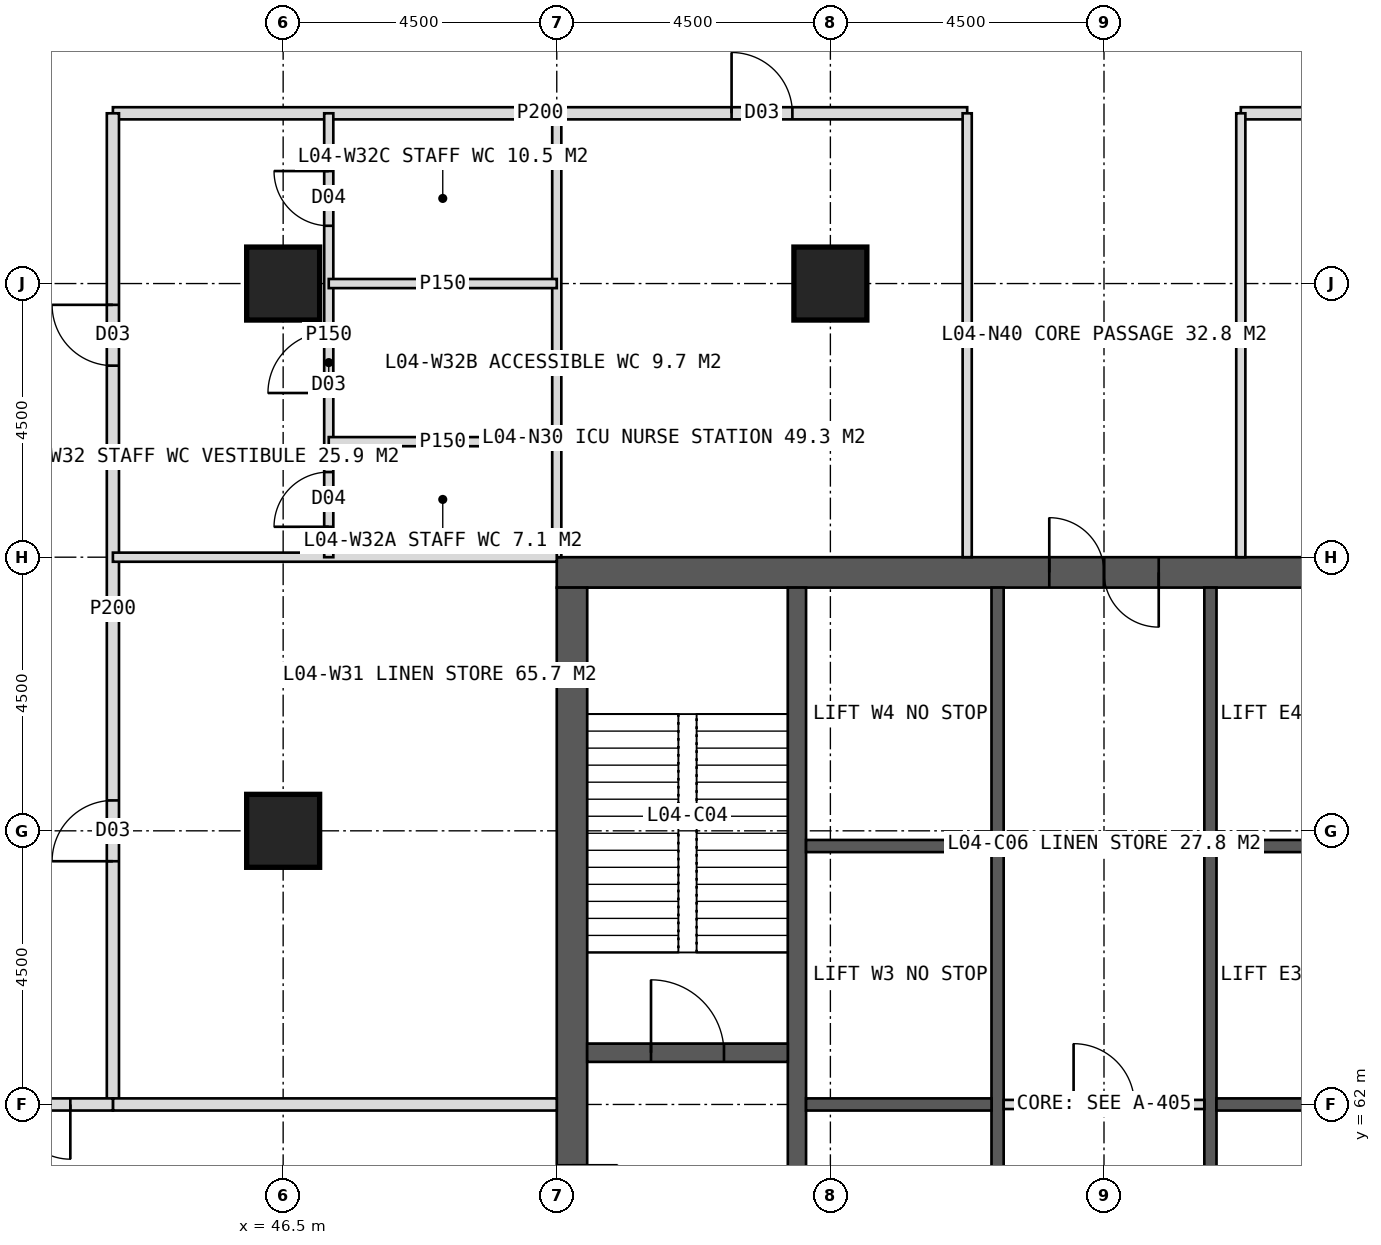
"""IFC4 building model, lengths in metres.
Left out: names, types, materials, properties, quantities, classifications, styles, units other than length and angle.
Written with IfcOpenShell. Run it as: python <this file> out.ifc"""

import sys

from ifc_helpers import new_model, si_unit, direction, frame, frame_2d, origin, origin_2d, place, context, subcontext, project, spatial, rectangle, hollow_rectangle, extrude, element, fill, save


model = new_model("IFC4")
c1 = context("Model", 3, precision=1e-05, world=origin(), true_north=direction((0.0, 1.0)))
c2 = subcontext(c1, "Body", "Model", "MODEL_VIEW")
j1 = project(units=[si_unit("LENGTHUNIT", "METRE"), si_unit("PLANEANGLEUNIT", "RADIAN")], contexts=[c1])
p1 = place(None, origin())
s1 = spatial("IfcSite", under=j1, at=p1, CompositionType="ELEMENT")
p2 = place(p1, origin())
s2 = spatial("IfcBuilding", under=s1, at=p2, CompositionType="ELEMENT")
p3 = place(p2, frame((0.0, 0.0, 21.0)))
s3 = spatial("IfcBuildingStorey", under=s2, at=p3, CompositionType="ELEMENT", Elevation=21.0)
p4 = place(p3, frame((51.0, 70.75, 0.0), z_axis=(0.0, 0.0, 1.0), x_axis=(1.0, 0.0, 0.0)))
e1 = element("IfcWall", 1, at=p4, inside=s3, PredefinedType="SHEAR", context=c2, shape_type="SweptSolid", body=[
    extrude(rectangle(XDim=18.0, YDim=0.5, at=frame_2d((9.0, 0.0))), origin(), (0.0, 0.0, 1.0), 5.0),
])
p5 = place(p4, frame((8.1, 0.0, 0.0)))
e2 = element("IfcOpeningElement", 2, at=p5, cuts=e1, PredefinedType="OPENING", context=c2, shape_type="SweptSolid", body=[
    extrude(rectangle(XDim=1.8, YDim=2.2, at=frame_2d((0.9, 1.1))), frame((0.0, 0.26, 0.0), z_axis=(0.0, -1.0, 0.0), x_axis=(1.0, 0.0, 0.0)), (0.0, 0.0, 1.0), 0.52),
])
p6 = place(p3, frame((51.25, 53.5, 0.0), z_axis=(0.0, 0.0, 1.0), x_axis=(0.0, 1.0, 0.0)))
e3 = element("IfcWall", 3, at=p6, inside=s3, PredefinedType="SHEAR", context=c2, shape_type="SweptSolid", body=[
    extrude(rectangle(XDim=17.0, YDim=0.5, at=frame_2d((8.5, 0.0))), origin(), (0.0, 0.0, 1.0), 5.0),
])
p7 = place(p6, frame((6.0, 0.0, 0.0)))
e4 = element("IfcOpeningElement", 4, at=p7, cuts=e3, PredefinedType="OPENING", context=c2, shape_type="SweptSolid", body=[
    extrude(rectangle(XDim=1.5, YDim=2.2, at=frame_2d((0.75, 1.1))), frame((0.0, 0.26, 0.0), z_axis=(0.0, -1.0, 0.0), x_axis=(1.0, 0.0, 0.0)), (0.0, 0.0, 1.0), 0.52),
])
p8 = place(p3, frame((54.95, 53.5, 0.0), z_axis=(0.0, 0.0, 1.0), x_axis=(0.0, 1.0, 0.0)))
e5 = element("IfcWall", 5, at=p8, inside=s3, PredefinedType="SHEAR", context=c2, shape_type="SweptSolid", body=[
    extrude(rectangle(XDim=17.0, YDim=0.3, at=frame_2d((8.5, 0.0))), origin(), (0.0, 0.0, 1.0), 5.0),
])
p9 = place(p3, frame((58.25, 53.5, 0.0), z_axis=(0.0, 0.0, 1.0), x_axis=(0.0, 1.0, 0.0)))
e6 = element("IfcWall", 6, at=p9, inside=s3, PredefinedType="SHEAR", context=c2, shape_type="SweptSolid", body=[
    extrude(rectangle(XDim=17.0, YDim=0.2, at=frame_2d((8.5, 0.0))), origin(), (0.0, 0.0, 1.0), 5.0),
])
p10 = place(p9, frame((1.375, 0.0, 0.0)))
e7 = element("IfcOpeningElement", 7, at=p10, cuts=e6, PredefinedType="OPENING", context=c2, shape_type="SweptSolid", body=[
    extrude(rectangle(XDim=1.4, YDim=2.2, at=frame_2d((0.7, 1.1))), frame((0.0, 0.11, 0.0), z_axis=(0.0, -1.0, 0.0), x_axis=(1.0, 0.0, 0.0)), (0.0, 0.0, 1.0), 0.22),
])
p11 = place(p9, frame((5.675, 0.0, 0.0)))
e8 = element("IfcOpeningElement", 8, at=p11, cuts=e6, PredefinedType="OPENING", context=c2, shape_type="SweptSolid", body=[
    extrude(rectangle(XDim=1.4, YDim=2.2, at=frame_2d((0.7, 1.1))), frame((0.0, 0.11, 0.0), z_axis=(0.0, -1.0, 0.0), x_axis=(1.0, 0.0, 0.0)), (0.0, 0.0, 1.0), 0.22),
])
p12 = place(p3, frame((61.75, 53.5, 0.0), z_axis=(0.0, 0.0, 1.0), x_axis=(0.0, 1.0, 0.0)))
e9 = element("IfcWall", 9, at=p12, inside=s3, PredefinedType="SHEAR", context=c2, shape_type="SweptSolid", body=[
    extrude(rectangle(XDim=17.0, YDim=0.2, at=frame_2d((8.5, 0.0))), origin(), (0.0, 0.0, 1.0), 5.0),
])
p13 = place(p12, frame((1.375, 0.0, 0.0)))
e10 = element("IfcOpeningElement", 10, at=p13, cuts=e9, PredefinedType="OPENING", context=c2, shape_type="SweptSolid", body=[
    extrude(rectangle(XDim=1.4, YDim=2.2, at=frame_2d((0.7, 1.1))), frame((0.0, 0.11, 0.0), z_axis=(0.0, -1.0, 0.0), x_axis=(1.0, 0.0, 0.0)), (0.0, 0.0, 1.0), 0.22),
])
p14 = place(p12, frame((5.675, 0.0, 0.0)))
e11 = element("IfcOpeningElement", 11, at=p14, cuts=e9, PredefinedType="OPENING", context=c2, shape_type="SweptSolid", body=[
    extrude(rectangle(XDim=1.4, YDim=2.2, at=frame_2d((0.7, 1.1))), frame((0.0, 0.11, 0.0), z_axis=(0.0, -1.0, 0.0), x_axis=(1.0, 0.0, 0.0)), (0.0, 0.0, 1.0), 0.22),
])
for number, where, z_axis, x_axis in (
    (12, (55.1, 62.0, 0.0), (0.0, 0.0, 1.0), (1.0, 0.0, 0.0)),
    (13, (61.85, 62.0, 0.0), (0.0, 0.0, 1.0), (1.0, 0.0, 0.0)),
    (14, (55.1, 66.25, 0.0), (0.0, 0.0, 1.0), (1.0, 0.0, 0.0)),
    (15, (61.85, 66.25, 0.0), (0.0, 0.0, 1.0), (1.0, 0.0, 0.0)),
):
    element("IfcWall", number, at=place(p3, frame(where, z_axis=z_axis, x_axis=x_axis)), inside=s3, PredefinedType="SHEAR", context=c2, shape_type="SweptSolid", body=[
        extrude(rectangle(XDim=3.05, YDim=0.2, at=frame_2d((1.525, 0.0))), origin(), (0.0, 0.0, 1.0), 5.0),
    ])
p15 = place(p3, frame((51.5, 62.85, 0.0), z_axis=(0.0, 0.0, 1.0), x_axis=(1.0, 0.0, 0.0)))
e16 = element("IfcWall", 16, at=p15, inside=s3, PredefinedType="SHEAR", context=c2, shape_type="SweptSolid", body=[
    extrude(rectangle(XDim=3.3, YDim=0.3, at=frame_2d((1.65, 0.0))), origin(), (0.0, 0.0, 1.0), 5.0),
])
p16 = place(p15, frame((1.05, 0.0, 0.0)))
e17 = element("IfcOpeningElement", 17, at=p16, cuts=e16, PredefinedType="OPENING", context=c2, shape_type="SweptSolid", body=[
    extrude(rectangle(XDim=1.2, YDim=2.1, at=frame_2d((0.6, 1.05))), frame((0.0, 0.16, 0.0), z_axis=(0.0, -1.0, 0.0), x_axis=(1.0, 0.0, 0.0)), (0.0, 0.0, 1.0), 0.32),
])
for number, where, z_axis, x_axis in (
    (18, (46.5, 75.5, 0.0), (0.0, 0.0, 1.0), (1.0, 0.0, 0.0)),
    (19, (55.5, 75.5, 0.0), (0.0, 0.0, 1.0), (1.0, 0.0, 0.0)),
    (20, (46.5, 66.5, 0.0), (0.0, 0.0, 1.0), (1.0, 0.0, 0.0)),
):
    element("IfcColumn", number, at=place(p3, frame(where, z_axis=z_axis, x_axis=x_axis)), inside=s3, PredefinedType="COLUMN", context=c2, shape_type="SweptSolid", body=[
        extrude(hollow_rectangle(XDim=1.2, YDim=1.2, WallThickness=0.1, at=origin_2d()), origin(), (0.0, 0.0, 1.0), 5.0),
    ])
p17 = place(p3, frame((43.7, 78.3, 0.0), z_axis=(0.0, 0.0, 1.0), x_axis=(1.0, 0.0, 0.0)))
e21 = element("IfcWall", 21, at=p17, inside=s3, PredefinedType="PARTITIONING", context=c2, shape_type="SweptSolid", body=[
    extrude(rectangle(XDim=14.05, YDim=0.2, at=frame_2d((7.025, 0.0))), origin(), (0.0, 0.0, 1.0), 4.7),
])
p18 = place(p17, frame((10.175, 0.0, 0.0)))
e22 = element("IfcOpeningElement", 22, at=p18, cuts=e21, PredefinedType="OPENING", context=c2, shape_type="SweptSolid", body=[
    extrude(rectangle(XDim=1.0, YDim=2.1, at=frame_2d((0.5, 1.05))), frame((0.0, 0.11, 0.0), z_axis=(0.0, -1.0, 0.0), x_axis=(1.0, 0.0, 0.0)), (0.0, 0.0, 1.0), 0.22),
])
p19 = place(p3, frame((62.25, 78.3, 0.0), z_axis=(0.0, 0.0, 1.0), x_axis=(1.0, 0.0, 0.0)))
e23 = element("IfcWall", 23, at=p19, inside=s3, PredefinedType="PARTITIONING", context=c2, shape_type="SweptSolid", body=[
    extrude(rectangle(XDim=6.75, YDim=0.2, at=frame_2d((3.375, 0.0))), origin(), (0.0, 0.0, 1.0), 4.7),
])
p20 = place(p19, frame((2.875, 0.0, 0.0)))
e24 = element("IfcOpeningElement", 24, at=p20, cuts=e23, PredefinedType="OPENING", context=c2, shape_type="SweptSolid", body=[
    extrude(rectangle(XDim=1.0, YDim=2.1, at=frame_2d((0.5, 1.05))), frame((0.0, 0.11, 0.0), z_axis=(0.0, -1.0, 0.0), x_axis=(1.0, 0.0, 0.0)), (0.0, 0.0, 1.0), 0.22),
])
for number, where, z_axis, x_axis in (
    (25, (51.0, 71.0, 0.0), (0.0, 0.0, 1.0), (0.0, 1.0, 0.0)),
    (26, (57.75, 71.0, 0.0), (0.0, 0.0, 1.0), (0.0, 1.0, 0.0)),
    (27, (62.25, 71.0, 0.0), (0.0, 0.0, 1.0), (0.0, 1.0, 0.0)),
):
    element("IfcWall", number, at=place(p3, frame(where, z_axis=z_axis, x_axis=x_axis)), inside=s3, PredefinedType="PARTITIONING", context=c2, shape_type="SweptSolid", body=[
        extrude(rectangle(XDim=7.3, YDim=0.15, at=frame_2d((3.65, 0.0))), origin(), (0.0, 0.0, 1.0), 4.7),
    ])
p21 = place(p3, frame((43.7, 62.0, 0.0), z_axis=(0.0, 0.0, 1.0), x_axis=(0.0, 1.0, 0.0)))
e28 = element("IfcWall", 28, at=p21, inside=s3, PredefinedType="PARTITIONING", context=c2, shape_type="SweptSolid", body=[
    extrude(rectangle(XDim=16.3, YDim=0.2, at=frame_2d((8.15, 0.0))), origin(), (0.0, 0.0, 1.0), 4.7),
])
p22 = place(p21, frame((4.0, 0.0, 0.0)))
e29 = element("IfcOpeningElement", 29, at=p22, cuts=e28, PredefinedType="OPENING", context=c2, shape_type="SweptSolid", body=[
    extrude(rectangle(XDim=1.0, YDim=2.1, at=frame_2d((0.5, 1.05))), frame((0.0, 0.11, 0.0), z_axis=(0.0, -1.0, 0.0), x_axis=(1.0, 0.0, 0.0)), (0.0, 0.0, 1.0), 0.22),
])
p23 = place(p21, frame((12.15, 0.0, 0.0)))
e30 = element("IfcOpeningElement", 30, at=p23, cuts=e28, PredefinedType="OPENING", context=c2, shape_type="SweptSolid", body=[
    extrude(rectangle(XDim=1.0, YDim=2.1, at=frame_2d((0.5, 1.05))), frame((0.0, 0.11, 0.0), z_axis=(0.0, -1.0, 0.0), x_axis=(1.0, 0.0, 0.0)), (0.0, 0.0, 1.0), 0.22),
])
p24 = place(p3, frame((51.0, 62.0, 0.0), z_axis=(0.0, 0.0, 1.0), x_axis=(-1.0, 0.0, 0.0)))
e31 = element("IfcWall", 31, at=p24, inside=s3, PredefinedType="SOLIDWALL", context=c2, shape_type="SweptSolid", body=[
    extrude(rectangle(XDim=7.3, YDim=0.2, at=frame_2d((3.65, 0.0))), origin(), (0.0, 0.0, 1.0), 3.7),
])
p25 = place(p3, frame((51.0, 71.0, 0.0), z_axis=(0.0, 0.0, 1.0), x_axis=(-1.0, 0.0, 0.0)))
e32 = element("IfcWall", 32, at=p25, inside=s3, PredefinedType="PARTITIONING", context=c2, shape_type="SweptSolid", body=[
    extrude(rectangle(XDim=7.3, YDim=0.15, at=frame_2d((3.65, 0.0))), origin(), (0.0, 0.0, 1.0), 4.7),
])
p26 = place(p3, frame((47.25, 71.0, 0.0), z_axis=(0.0, 0.0, 1.0), x_axis=(0.0, 1.0, 0.0)))
e33 = element("IfcWall", 33, at=p26, inside=s3, PredefinedType="PARTITIONING", context=c2, shape_type="SweptSolid", body=[
    extrude(rectangle(XDim=7.3, YDim=0.15, at=frame_2d((3.65, 0.0))), origin(), (0.0, 0.0, 1.0), 4.7),
])
p27 = place(p26, frame((0.5, 0.0, 0.0)))
e34 = element("IfcOpeningElement", 34, at=p27, cuts=e33, PredefinedType="OPENING", context=c2, shape_type="SweptSolid", body=[
    extrude(rectangle(XDim=0.9, YDim=2.1, at=frame_2d((0.45, 1.05))), frame((0.0, 0.085, 0.0), z_axis=(0.0, -1.0, 0.0), x_axis=(1.0, 0.0, 0.0)), (0.0, 0.0, 1.0), 0.17),
])
p28 = place(p26, frame((2.7, 0.0, 0.0)))
e35 = element("IfcOpeningElement", 35, at=p28, cuts=e33, PredefinedType="OPENING", context=c2, shape_type="SweptSolid", body=[
    extrude(rectangle(XDim=1.0, YDim=2.1, at=frame_2d((0.5, 1.05))), frame((0.0, 0.085, 0.0), z_axis=(0.0, -1.0, 0.0), x_axis=(1.0, 0.0, 0.0)), (0.0, 0.0, 1.0), 0.17),
])
p29 = place(p26, frame((5.45, 0.0, 0.0)))
e36 = element("IfcOpeningElement", 36, at=p29, cuts=e33, PredefinedType="OPENING", context=c2, shape_type="SweptSolid", body=[
    extrude(rectangle(XDim=0.9, YDim=2.1, at=frame_2d((0.45, 1.05))), frame((0.0, 0.085, 0.0), z_axis=(0.0, -1.0, 0.0), x_axis=(1.0, 0.0, 0.0)), (0.0, 0.0, 1.0), 0.17),
])
p30 = place(p3, frame((51.0, 72.9, 0.0), z_axis=(0.0, 0.0, 1.0), x_axis=(-1.0, 0.0, 0.0)))
e37 = element("IfcWall", 37, at=p30, inside=s3, PredefinedType="PARTITIONING", context=c2, shape_type="SweptSolid", body=[
    extrude(rectangle(XDim=3.75, YDim=0.15, at=frame_2d((1.875, 0.0))), origin(), (0.0, 0.0, 1.0), 4.7),
])
p31 = place(p3, frame((51.0, 75.5, 0.0), z_axis=(0.0, 0.0, 1.0), x_axis=(-1.0, 0.0, 0.0)))
e38 = element("IfcWall", 38, at=p31, inside=s3, PredefinedType="PARTITIONING", context=c2, shape_type="SweptSolid", body=[
    extrude(rectangle(XDim=3.75, YDim=0.15, at=frame_2d((1.875, 0.0))), origin(), (0.0, 0.0, 1.0), 3.7),
])
p32 = place(p3, frame((43.7, 62.0, 0.0), z_axis=(0.0, 0.0, 1.0), x_axis=(-1.0, 0.0, 0.0)))
e39 = element("IfcWall", 39, at=p32, inside=s3, PredefinedType="SOLIDWALL", context=c2, shape_type="SweptSolid", body=[
    extrude(rectangle(XDim=3.2, YDim=0.2, at=frame_2d((1.6, 0.0))), origin(), (0.0, 0.0, 1.0), 3.7),
])
p33 = place(p32, frame((0.7, 0.0, 0.0)))
e40 = element("IfcOpeningElement", 40, at=p33, cuts=e39, PredefinedType="OPENING", context=c2, shape_type="SweptSolid", body=[
    extrude(rectangle(XDim=1.8, YDim=2.2, at=frame_2d((0.9, 1.1))), frame((0.0, 0.11, 0.0), z_axis=(0.0, -1.0, 0.0), x_axis=(1.0, 0.0, 0.0)), (0.0, 0.0, 1.0), 0.22),
])
p34 = place(p3, frame((58.35, 62.0, 0.0), z_axis=(0.0, 0.0, 1.0), x_axis=(1.0, 0.0, 0.0)))
e41 = element("IfcWall", 41, at=p34, inside=s3, PredefinedType="PARTITIONING", context=c2, shape_type="SweptSolid", body=[
    extrude(rectangle(XDim=3.3, YDim=0.15, at=frame_2d((1.65, 0.0))), origin(), (0.0, 0.0, 1.0), 4.7),
])
p35 = place(p34, frame((1.15, 0.0, 0.0)))
e42 = element("IfcOpeningElement", 42, at=p35, cuts=e41, PredefinedType="OPENING", context=c2, shape_type="SweptSolid", body=[
    extrude(rectangle(XDim=1.0, YDim=2.1, at=frame_2d((0.5, 1.05))), frame((0.0, 0.085, 0.0), z_axis=(0.0, -1.0, 0.0), x_axis=(1.0, 0.0, 0.0)), (0.0, 0.0, 1.0), 0.17),
])
p36 = place(p18, origin())
e43 = element("IfcDoor", 43, at=p36, inside=s3, OperationType="SINGLE_SWING_LEFT", PredefinedType="DOOR", context=c2, shape_type="SweptSolid", body=[
    extrude(rectangle(XDim=1.0, YDim=2.1, at=frame_2d((0.5, 1.05))), frame((0.0, 0.025, 0.0), z_axis=(0.0, -1.0, 0.0), x_axis=(1.0, 0.0, 0.0)), (0.0, 0.0, 1.0), 0.05),
])
fill(e22, e43)
p37 = place(p22, origin())
e44 = element("IfcDoor", 44, at=p37, inside=s3, OperationType="SINGLE_SWING_LEFT", PredefinedType="DOOR", context=c2, shape_type="SweptSolid", body=[
    extrude(rectangle(XDim=1.0, YDim=2.1, at=frame_2d((0.5, 1.05))), frame((0.0, 0.025, 0.0), z_axis=(0.0, -1.0, 0.0), x_axis=(1.0, 0.0, 0.0)), (0.0, 0.0, 1.0), 0.05),
])
fill(e29, e44)
p38 = place(p23, origin())
e45 = element("IfcDoor", 45, at=p38, inside=s3, OperationType="SINGLE_SWING_RIGHT", PredefinedType="DOOR", context=c2, shape_type="SweptSolid", body=[
    extrude(rectangle(XDim=1.0, YDim=2.1, at=frame_2d((0.5, 1.05))), frame((0.0, 0.025, 0.0), z_axis=(0.0, -1.0, 0.0), x_axis=(1.0, 0.0, 0.0)), (0.0, 0.0, 1.0), 0.05),
])
fill(e30, e45)
p39 = place(p33, origin())
e46 = element("IfcDoor", 46, at=p39, inside=s3, OperationType="DOUBLE_DOOR_DOUBLE_SWING", PredefinedType="DOOR", context=c2, shape_type="SweptSolid", body=[
    extrude(rectangle(XDim=1.8, YDim=2.2, at=frame_2d((0.9, 1.1))), frame((0.0, 0.025, 0.0), z_axis=(0.0, -1.0, 0.0), x_axis=(1.0, 0.0, 0.0)), (0.0, 0.0, 1.0), 0.05),
])
fill(e40, e46)
p40 = place(p16, origin())
e47 = element("IfcDoor", 47, at=p40, inside=s3, OperationType="SINGLE_SWING_LEFT", PredefinedType="DOOR", context=c2, shape_type="SweptSolid", body=[
    extrude(rectangle(XDim=1.2, YDim=2.1, at=frame_2d((0.6, 1.05))), frame((0.0, 0.025, 0.0), z_axis=(0.0, -1.0, 0.0), x_axis=(1.0, 0.0, 0.0)), (0.0, 0.0, 1.0), 0.05),
])
fill(e17, e47)
p41 = place(p35, origin())
e48 = element("IfcDoor", 48, at=p41, inside=s3, OperationType="SINGLE_SWING_LEFT", PredefinedType="DOOR", context=c2, shape_type="SweptSolid", body=[
    extrude(rectangle(XDim=1.0, YDim=2.1, at=frame_2d((0.5, 1.05))), frame((0.0, 0.025, 0.0), z_axis=(0.0, -1.0, 0.0), x_axis=(1.0, 0.0, 0.0)), (0.0, 0.0, 1.0), 0.05),
])
fill(e42, e48)
p42 = place(p5, origin())
e49 = element("IfcDoor", 49, at=p42, inside=s3, OperationType="DOUBLE_DOOR_SINGLE_SWING", PredefinedType="DOOR", context=c2, shape_type="SweptSolid", body=[
    extrude(rectangle(XDim=1.8, YDim=2.2, at=frame_2d((0.9, 1.1))), frame((0.0, 0.025, 0.0), z_axis=(0.0, -1.0, 0.0), x_axis=(1.0, 0.0, 0.0)), (0.0, 0.0, 1.0), 0.05),
])
fill(e2, e49)
p43 = place(p27, origin())
e50 = element("IfcDoor", 50, at=p43, inside=s3, OperationType="SINGLE_SWING_LEFT", PredefinedType="DOOR", context=c2, shape_type="SweptSolid", body=[
    extrude(rectangle(XDim=0.9, YDim=2.1, at=frame_2d((0.45, 1.05))), frame((0.0, 0.025, 0.0), z_axis=(0.0, -1.0, 0.0), x_axis=(1.0, 0.0, 0.0)), (0.0, 0.0, 1.0), 0.05),
])
fill(e34, e50)
p44 = place(p28, origin())
e51 = element("IfcDoor", 51, at=p44, inside=s3, OperationType="SINGLE_SWING_LEFT", PredefinedType="DOOR", context=c2, shape_type="SweptSolid", body=[
    extrude(rectangle(XDim=1.0, YDim=2.1, at=frame_2d((0.5, 1.05))), frame((0.0, 0.025, 0.0), z_axis=(0.0, -1.0, 0.0), x_axis=(1.0, 0.0, 0.0)), (0.0, 0.0, 1.0), 0.05),
])
fill(e35, e51)
p45 = place(p29, origin())
e52 = element("IfcDoor", 52, at=p45, inside=s3, OperationType="SINGLE_SWING_RIGHT", PredefinedType="DOOR", context=c2, shape_type="SweptSolid", body=[
    extrude(rectangle(XDim=0.9, YDim=2.1, at=frame_2d((0.45, 1.05))), frame((0.0, 0.025, 0.0), z_axis=(0.0, -1.0, 0.0), x_axis=(1.0, 0.0, 0.0)), (0.0, 0.0, 1.0), 0.05),
])
fill(e36, e52)
save(model, sys.argv[1])
